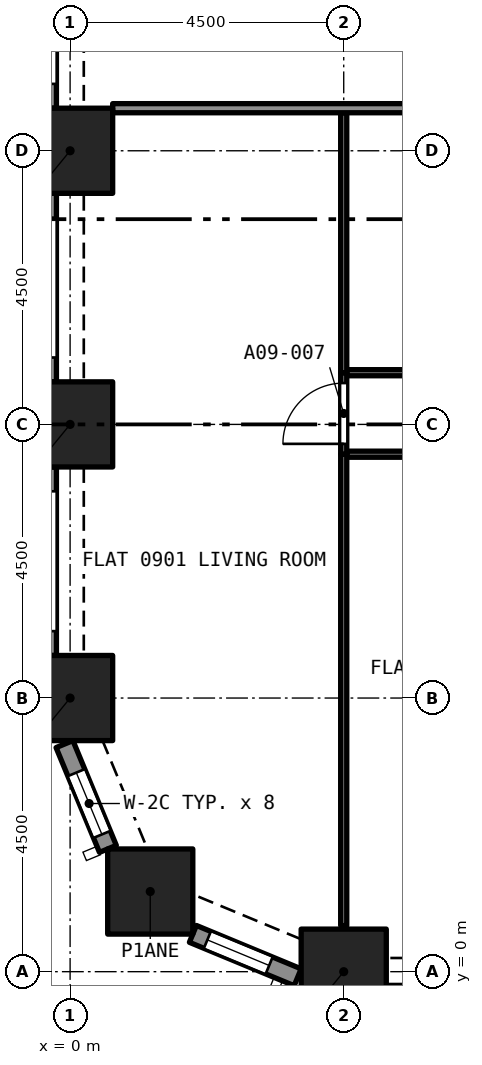
"""IFC4 building model, lengths in metres.
Left out: names, types, materials, properties, quantities, classifications, styles, units other than length and angle.
Written with IfcOpenShell. Run it as: python <this file> out.ifc"""

import sys

from ifc_helpers import new_model, si_unit, direction, frame, frame_2d, origin, origin_2d, place, context, subcontext, project, spatial, rectangle, extrude, element, fill, save


model = new_model("IFC4")
c1 = context("Model", 3, precision=1e-05, world=origin(), true_north=direction((0.0, 1.0)))
c2 = subcontext(c1, "Body", "Model", "MODEL_VIEW")
j1 = project(units=[si_unit("LENGTHUNIT", "METRE"), si_unit("PLANEANGLEUNIT", "RADIAN")], contexts=[c1])
p1 = place(None, origin())
s1 = spatial("IfcSite", under=j1, at=p1, CompositionType="ELEMENT")
p2 = place(p1, origin())
s2 = spatial("IfcBuilding", under=s1, at=p2, CompositionType="ELEMENT")
p3 = place(p2, frame((0.0, 0.0, 40.0)))
s3 = spatial("IfcBuildingStorey", under=s2, at=p3, CompositionType="ELEMENT", Elevation=40.0)
for number, where, z_axis, x_axis in (
    (1, (4.5, 0.0, 0.0), (0.0, 0.0, 1.0), (1.0, 0.0, 0.0)),
    (2, (1.318, 1.318, 0.0), (0.0, 0.0, 1.0), (1.0, 0.0, 0.0)),
    (3, (0.0, 4.5, 0.0), (0.0, 0.0, 1.0), (1.0, 0.0, 0.0)),
    (4, (0.0, 9.0, 0.0), (0.0, 0.0, 1.0), (1.0, 0.0, 0.0)),
    (5, (0.0, 13.5, 0.0), (0.0, 0.0, 1.0), (1.0, 0.0, 0.0)),
):
    element("IfcColumn", number, at=place(p3, frame(where, z_axis=z_axis, x_axis=x_axis)), inside=s3, PredefinedType="COLUMN", context=c2, shape_type="SweptSolid", body=[
        extrude(rectangle(XDim=1.4, YDim=1.4, at=origin_2d()), origin(), (0.0, 0.0, 1.0), 3.2),
    ])
p4 = place(p3, frame((0.622, 2.02, 0.0), z_axis=(0.0, 0.0, 1.0), x_axis=(-0.38262540684, 0.923903565336, 0.0)))
e6 = element("IfcWall", 6, at=p4, inside=s3, PredefinedType="SOLIDWALL", context=c2, shape_type="SweptSolid", body=[
    extrude(rectangle(XDim=1.865, YDim=0.3, at=frame_2d((0.933, 0.0))), origin(), (0.0, 0.0, 1.0), 3.2),
])
p5 = place(p4, frame((0.258, 0.0, 0.45)))
e7 = element("IfcOpeningElement", 7, at=p5, cuts=e6, PredefinedType="OPENING", context=c2, shape_type="SweptSolid", body=[
    extrude(rectangle(XDim=1.1, YDim=1.95, at=frame_2d((0.55, 0.975))), frame((0.0, 0.16, 0.0), z_axis=(0.0, -1.0, 0.0), x_axis=(1.0, 0.0, 0.0)), (0.0, 0.0, 1.0), 0.32),
])
p6 = place(p3, frame((3.743, -0.092, 0.0), z_axis=(0.0, 0.0, 1.0), x_axis=(-0.923857286003, 0.382737135771, 0.0)))
e8 = element("IfcWall", 8, at=p6, inside=s3, PredefinedType="SOLIDWALL", context=c2, shape_type="SweptSolid", body=[
    extrude(rectangle(XDim=1.865, YDim=0.3, at=frame_2d((0.933, 0.0))), origin(), (0.0, 0.0, 1.0), 3.2),
])
p7 = place(p6, frame((0.508, 0.0, 0.45)))
e9 = element("IfcOpeningElement", 9, at=p7, cuts=e8, PredefinedType="OPENING", context=c2, shape_type="SweptSolid", body=[
    extrude(rectangle(XDim=1.1, YDim=1.95, at=frame_2d((0.55, 0.975))), frame((0.0, 0.16, 0.0), z_axis=(0.0, -1.0, 0.0), x_axis=(1.0, 0.0, 0.0)), (0.0, 0.0, 1.0), 0.32),
])
p8 = place(p3, frame((-0.375, 14.2, 0.0), z_axis=(0.0, 0.0, 1.0), x_axis=(0.0, 1.0, 0.0)))
e10 = element("IfcWall", 10, at=p8, inside=s3, PredefinedType="SOLIDWALL", context=c2, shape_type="SweptSolid", body=[
    extrude(rectangle(XDim=3.1, YDim=0.3, at=frame_2d((1.55, 0.0))), origin(), (0.0, 0.0, 1.0), 3.2),
])
p9 = place(p8, frame((0.4, 0.0, 0.45)))
e11 = element("IfcOpeningElement", 11, at=p9, cuts=e10, PredefinedType="OPENING", context=c2, shape_type="SweptSolid", body=[
    extrude(rectangle(XDim=2.3, YDim=1.95, at=frame_2d((1.15, 0.975))), frame((0.0, 0.16, 0.0), z_axis=(0.0, -1.0, 0.0), x_axis=(1.0, 0.0, 0.0)), (0.0, 0.0, 1.0), 0.32),
])
p10 = place(p3, frame((-0.375, 9.7, 0.0), z_axis=(0.0, 0.0, 1.0), x_axis=(0.0, 1.0, 0.0)))
e12 = element("IfcWall", 12, at=p10, inside=s3, PredefinedType="SOLIDWALL", context=c2, shape_type="SweptSolid", body=[
    extrude(rectangle(XDim=3.1, YDim=0.3, at=frame_2d((1.55, 0.0))), origin(), (0.0, 0.0, 1.0), 3.2),
])
p11 = place(p10, frame((0.4, 0.0, 0.45)))
e13 = element("IfcOpeningElement", 13, at=p11, cuts=e12, PredefinedType="OPENING", context=c2, shape_type="SweptSolid", body=[
    extrude(rectangle(XDim=2.3, YDim=1.95, at=frame_2d((1.15, 0.975))), frame((0.0, 0.16, 0.0), z_axis=(0.0, -1.0, 0.0), x_axis=(1.0, 0.0, 0.0)), (0.0, 0.0, 1.0), 0.32),
])
p12 = place(p3, frame((-0.375, 5.2, 0.0), z_axis=(0.0, 0.0, 1.0), x_axis=(0.0, 1.0, 0.0)))
e14 = element("IfcWall", 14, at=p12, inside=s3, PredefinedType="SOLIDWALL", context=c2, shape_type="SweptSolid", body=[
    extrude(rectangle(XDim=3.1, YDim=0.3, at=frame_2d((1.55, 0.0))), origin(), (0.0, 0.0, 1.0), 3.2),
])
p13 = place(p12, frame((0.4, 0.0, 0.45)))
e15 = element("IfcOpeningElement", 15, at=p13, cuts=e14, PredefinedType="OPENING", context=c2, shape_type="SweptSolid", body=[
    extrude(rectangle(XDim=2.3, YDim=1.95, at=frame_2d((1.15, 0.975))), frame((0.0, 0.16, 0.0), z_axis=(0.0, -1.0, 0.0), x_axis=(1.0, 0.0, 0.0)), (0.0, 0.0, 1.0), 0.32),
])
p14 = place(p3, frame((9.0, 8.51, 0.0), z_axis=(0.0, 0.0, 1.0), x_axis=(-1.0, 0.0, 0.0)))
e16 = element("IfcWall", 16, at=p14, inside=s3, PredefinedType="PARTITIONING", context=c2, shape_type="SweptSolid", body=[
    extrude(rectangle(XDim=4.45, YDim=0.1, at=frame_2d((2.225, 0.0))), origin(), (0.0, 0.0, 1.0), 2.9),
])
p15 = place(p14, frame((1.8, 0.0, 0.0)))
e17 = element("IfcOpeningElement", 17, at=p15, cuts=e16, PredefinedType="OPENING", context=c2, shape_type="SweptSolid", body=[
    extrude(rectangle(XDim=0.9, YDim=2.1, at=frame_2d((0.45, 1.05))), frame((0.0, 0.06, 0.0), z_axis=(0.0, -1.0, 0.0), x_axis=(1.0, 0.0, 0.0)), (0.0, 0.0, 1.0), 0.12),
])
p16 = place(p3, frame((4.5, 0.758, 0.0), z_axis=(0.0, 0.0, 1.0), x_axis=(0.0, 1.0, 0.0)))
e18 = element("IfcWall", 18, at=p16, inside=s3, PredefinedType="PARTITIONING", context=c2, shape_type="SweptSolid", body=[
    extrude(rectangle(XDim=7.752, YDim=0.1, at=frame_2d((3.876, 0.0))), origin(), (0.0, 0.0, 1.0), 2.9),
])
p17 = place(p3, frame((4.55, 9.85, 0.0), z_axis=(0.0, 0.0, 1.0), x_axis=(1.0, 0.0, 0.0)))
e19 = element("IfcWall", 19, at=p17, inside=s3, PredefinedType="PARTITIONING", context=c2, shape_type="SweptSolid", body=[
    extrude(rectangle(XDim=3.057, YDim=0.1, at=frame_2d((1.528, 0.0))), origin(), (0.0, 0.0, 1.0), 2.9),
])
p18 = place(p17, frame((1.053, 0.0, 0.0)))
e20 = element("IfcOpeningElement", 20, at=p18, cuts=e19, PredefinedType="OPENING", context=c2, shape_type="SweptSolid", body=[
    extrude(rectangle(XDim=0.9, YDim=2.1, at=frame_2d((0.45, 1.05))), frame((0.0, 0.06, 0.0), z_axis=(0.0, -1.0, 0.0), x_axis=(1.0, 0.0, 0.0)), (0.0, 0.0, 1.0), 0.12),
])
p19 = place(p3, frame((4.5, 8.51, 0.0), z_axis=(0.0, 0.0, 1.0), x_axis=(0.0, 1.0, 0.0)))
e21 = element("IfcWall", 21, at=p19, inside=s3, PredefinedType="PARTITIONING", context=c2, shape_type="SweptSolid", body=[
    extrude(rectangle(XDim=1.34, YDim=0.1, at=frame_2d((0.67, 0.0))), origin(), (0.0, 0.0, 1.0), 2.9),
])
p20 = place(p19, frame((0.17, 0.0, 0.0)))
e22 = element("IfcOpeningElement", 22, at=p20, cuts=e21, PredefinedType="OPENING", context=c2, shape_type="SweptSolid", body=[
    extrude(rectangle(XDim=1.0, YDim=2.1, at=frame_2d((0.5, 1.05))), frame((0.0, 0.06, 0.0), z_axis=(0.0, -1.0, 0.0), x_axis=(1.0, 0.0, 0.0)), (0.0, 0.0, 1.0), 0.12),
])
p21 = place(p3, frame((4.5, 9.85, 0.0), z_axis=(0.0, 0.0, 1.0), x_axis=(0.0, 1.0, 0.0)))
e23 = element("IfcWall", 23, at=p21, inside=s3, PredefinedType="PARTITIONING", context=c2, shape_type="SweptSolid", body=[
    extrude(rectangle(XDim=4.275, YDim=0.1, at=frame_2d((2.137, 0.0))), origin(), (0.0, 0.0, 1.0), 2.9),
])
p22 = place(p3, frame((0.7, 14.2, 0.0), z_axis=(0.0, 0.0, 1.0), x_axis=(1.0, 0.0, 0.0)))
e24 = element("IfcWall", 24, at=p22, inside=s3, PredefinedType="PARTITIONING", context=c2, shape_type="SweptSolid", body=[
    extrude(rectangle(XDim=13.175, YDim=0.15, at=frame_2d((6.587, 0.0))), origin(), (0.0, 0.0, 1.0), 2.9),
])
p23 = place(p5, origin())
e25 = element("IfcWindow", 25, at=p23, inside=s3, PartitioningType="SINGLE_PANEL", PredefinedType="WINDOW", context=c2, shape_type="SweptSolid", body=[
    extrude(rectangle(XDim=1.1, YDim=1.95, at=frame_2d((0.55, 0.975))), frame((0.0, 0.03, 0.0), z_axis=(0.0, -1.0, 0.0), x_axis=(1.0, 0.0, 0.0)), (0.0, 0.0, 1.0), 0.06),
])
fill(e7, e25)
p24 = place(p7, origin())
e26 = element("IfcWindow", 26, at=p24, inside=s3, PartitioningType="SINGLE_PANEL", PredefinedType="WINDOW", context=c2, shape_type="SweptSolid", body=[
    extrude(rectangle(XDim=1.1, YDim=1.95, at=frame_2d((0.55, 0.975))), frame((0.0, 0.03, 0.0), z_axis=(0.0, -1.0, 0.0), x_axis=(1.0, 0.0, 0.0)), (0.0, 0.0, 1.0), 0.06),
])
fill(e9, e26)
p25 = place(p20, origin())
e27 = element("IfcDoor", 27, at=p25, inside=s3, OperationType="SINGLE_SWING_RIGHT", PredefinedType="DOOR", context=c2, shape_type="SweptSolid", body=[
    extrude(rectangle(XDim=1.0, YDim=2.1, at=frame_2d((0.5, 1.05))), frame((0.0, 0.025, 0.0), z_axis=(0.0, -1.0, 0.0), x_axis=(1.0, 0.0, 0.0)), (0.0, 0.0, 1.0), 0.05),
])
fill(e22, e27)
save(model, sys.argv[1])
